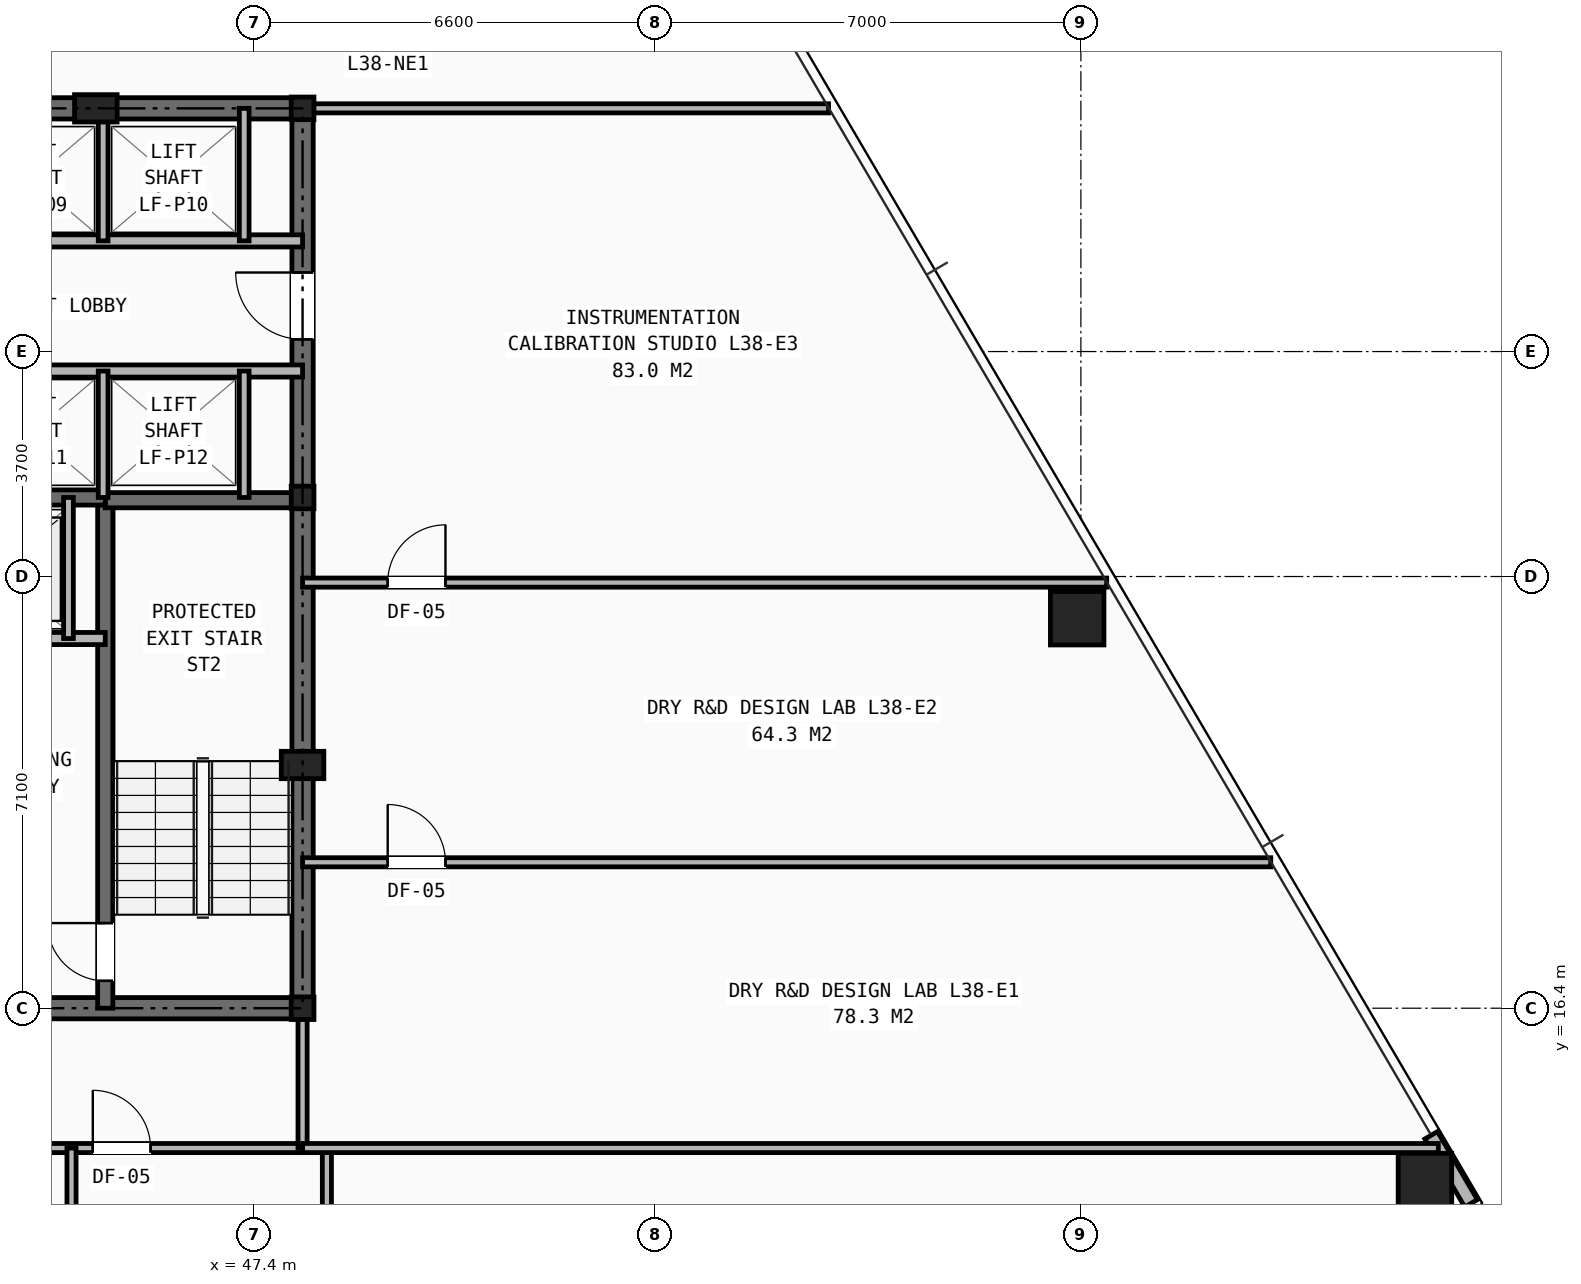
"""IFC4 building model, lengths in metres.
Left out: names, types, materials, properties, quantities, classifications, styles, units other than length and angle.
Written with IfcOpenShell. Run it as: python <this file> out.ifc"""

import sys

from ifc_helpers import new_model, si_unit, direction, frame, frame_2d, origin, origin_2d, place, context, subcontext, project, spatial, rectangle, hollow_rectangle, i_section, extrude, element, fill, save


model = new_model("IFC4")
c1 = context("Model", 3, precision=1e-05, world=origin(), true_north=direction((0.0, 1.0)))
c2 = subcontext(c1, "Body", "Model", "MODEL_VIEW")
j1 = project(units=[si_unit("LENGTHUNIT", "METRE"), si_unit("PLANEANGLEUNIT", "RADIAN")], contexts=[c1])
p1 = place(None, origin())
s1 = spatial("IfcSite", under=j1, at=p1, CompositionType="ELEMENT")
p2 = place(p1, origin())
s2 = spatial("IfcBuilding", under=s1, at=p2, CompositionType="ELEMENT")
p3 = place(p2, frame((0.0, 0.0, 133.25)))
s3 = spatial("IfcBuildingStorey", under=s2, at=p3, CompositionType="ELEMENT", Elevation=133.25)
for number, where, z_axis, x_axis in (
    (1, (48.2, 16.4, 0.0), (0.0, 0.0, 1.0), (1.0, 0.0, 0.0)),
    (2, (48.2, 24.8, 0.0), (0.0, 0.0, 1.0), (1.0, 0.0, 0.0)),
    (3, (48.2, 31.2, 0.0), (0.0, 0.0, 1.0), (1.0, 0.0, 0.0)),
):
    element("IfcColumn", number, at=place(p3, frame(where, z_axis=z_axis, x_axis=x_axis)), inside=s3, PredefinedType="COLUMN", context=c2, shape_type="SweptSolid", body=[
        extrude(i_section(OverallWidth=0.374, OverallDepth=0.372, WebThickness=0.016, FlangeThickness=0.026, at=origin_2d()), origin(), (0.0, 0.0, 1.0), 3.45),
    ])
for number, where, z_axis, x_axis in (
    (4, (48.2, 20.4, 0.0), (0.0, 0.0, 1.0), (1.0, 0.0, 0.0)),
    (5, (44.8, 31.2, 0.0), (0.0, 0.0, 1.0), (1.0, 0.0, 0.0)),
):
    element("IfcColumn", number, at=place(p3, frame(where, z_axis=z_axis, x_axis=x_axis)), inside=s3, PredefinedType="PILASTER", context=c2, shape_type="SweptSolid", body=[
        extrude(rectangle(XDim=0.7, YDim=0.45, at=origin_2d()), origin(), (0.0, 0.0, 1.0), 3.45),
    ])
for number, where, z_axis, x_axis in (
    (6, (66.658, 13.573, 0.0), (0.0, 0.0, 1.0), (1.0, 0.0, 0.0)),
    (7, (60.939, 22.814, 0.0), (0.0, 0.0, 1.0), (1.0, 0.0, 0.0)),
):
    element("IfcColumn", number, at=place(p3, frame(where, z_axis=z_axis, x_axis=x_axis)), inside=s3, PredefinedType="COLUMN", context=c2, shape_type="SweptSolid", body=[
        extrude(hollow_rectangle(XDim=0.88, YDim=0.88, WallThickness=0.06, at=origin_2d()), origin(), (0.0, 0.0, 1.0), 3.45),
    ])
p4 = place(p3, frame((67.417, 13.191, 0.0), z_axis=(0.0, 0.0, 1.0), x_axis=(-0.50575330013, 0.86267815517, 0.0)))
e8 = element("IfcWall", 8, at=p4, inside=s3, PredefinedType="SHEAR", context=c2, shape_type="SweptSolid", body=[
    extrude(rectangle(XDim=1.298, YDim=0.24, at=frame_2d((0.649, 0.0))), origin(), (0.0, 0.0, 1.0), 2.583),
])
p5 = place(p3, frame((31.8, 16.4, 0.0), z_axis=(0.0, 0.0, 1.0), x_axis=(1.0, 0.0, 0.0)))
e9 = element("IfcWall", 9, at=p5, inside=s3, PredefinedType="SHEAR", context=c2, shape_type="SweptSolid", body=[
    extrude(rectangle(XDim=16.4, YDim=0.35, at=frame_2d((8.2, 0.0))), origin(), (0.0, 0.0, 1.0), 3.21),
])
p6 = place(p5, frame((7.75, 0.0, 0.0)))
e10 = element("IfcOpeningElement", 10, at=p6, cuts=e9, PredefinedType="OPENING", context=c2, shape_type="SweptSolid", body=[
    extrude(rectangle(XDim=0.9, YDim=2.1, at=frame_2d((0.45, 1.05))), frame((0.0, 0.185, 0.0), z_axis=(0.0, -1.0, 0.0), x_axis=(1.0, 0.0, 0.0)), (0.0, 0.0, 1.0), 0.37),
])
p7 = place(p5, frame((4.2, 0.0, 0.0)))
e11 = element("IfcOpeningElement", 11, at=p7, cuts=e9, PredefinedType="OPENING", context=c2, shape_type="SweptSolid", body=[
    extrude(rectangle(XDim=0.95, YDim=2.1, at=frame_2d((0.475, 1.05))), frame((0.0, 0.185, 0.0), z_axis=(0.0, -1.0, 0.0), x_axis=(1.0, 0.0, 0.0)), (0.0, 0.0, 1.0), 0.37),
])
p8 = place(p5, frame((10.6, 0.0, 0.0)))
e12 = element("IfcOpeningElement", 12, at=p8, cuts=e9, PredefinedType="OPENING", context=c2, shape_type="SweptSolid", body=[
    extrude(rectangle(XDim=0.95, YDim=2.1, at=frame_2d((0.475, 1.05))), frame((0.0, 0.185, 0.0), z_axis=(0.0, -1.0, 0.0), x_axis=(1.0, 0.0, 0.0)), (0.0, 0.0, 1.0), 0.37),
])
p9 = place(p3, frame((31.8, 31.2, 0.0), z_axis=(0.0, 0.0, 1.0), x_axis=(1.0, 0.0, 0.0)))
e13 = element("IfcWall", 13, at=p9, inside=s3, PredefinedType="SHEAR", context=c2, shape_type="SweptSolid", body=[
    extrude(rectangle(XDim=16.4, YDim=0.35, at=frame_2d((8.2, 0.0))), origin(), (0.0, 0.0, 1.0), 3.21),
])
p10 = place(p3, frame((48.2, 16.4, 0.0), z_axis=(0.0, 0.0, 1.0), x_axis=(0.0, 1.0, 0.0)))
e14 = element("IfcWall", 14, at=p10, inside=s3, PredefinedType="SHEAR", context=c2, shape_type="SweptSolid", body=[
    extrude(rectangle(XDim=14.8, YDim=0.35, at=frame_2d((7.4, 0.0))), origin(), (0.0, 0.0, 1.0), 3.21),
])
p11 = place(p10, frame((11.0, 0.0, 0.0)))
e15 = element("IfcOpeningElement", 15, at=p11, cuts=e14, PredefinedType="OPENING", context=c2, shape_type="SweptSolid", body=[
    extrude(rectangle(XDim=1.1, YDim=2.15, at=frame_2d((0.55, 1.075))), frame((0.0, 0.185, 0.0), z_axis=(0.0, -1.0, 0.0), x_axis=(1.0, 0.0, 0.0)), (0.0, 0.0, 1.0), 0.37),
])
p12 = place(p3, frame((44.955, 16.4, 0.0), z_axis=(0.0, 0.0, 1.0), x_axis=(0.0, 1.0, 0.0)))
e16 = element("IfcWall", 16, at=p12, inside=s3, PredefinedType="SHEAR", context=c2, shape_type="SweptSolid", body=[
    extrude(rectangle(XDim=8.4, YDim=0.25, at=frame_2d((4.2, 0.0))), origin(), (0.0, 0.0, 1.0), 3.21),
])
p13 = place(p12, frame((0.45, 0.0, 0.0)))
e17 = element("IfcOpeningElement", 17, at=p13, cuts=e16, PredefinedType="OPENING", context=c2, shape_type="SweptSolid", body=[
    extrude(rectangle(XDim=0.95, YDim=2.1, at=frame_2d((0.475, 1.05))), frame((0.0, 0.135, 0.0), z_axis=(0.0, -1.0, 0.0), x_axis=(1.0, 0.0, 0.0)), (0.0, 0.0, 1.0), 0.27),
])
p14 = place(p3, frame((44.955, 24.755, 0.0), z_axis=(0.0, 0.0, 1.0), x_axis=(1.0, 0.0, 0.0)))
e18 = element("IfcWall", 18, at=p14, inside=s3, PredefinedType="SHEAR", context=c2, shape_type="SweptSolid", body=[
    extrude(rectangle(XDim=3.245, YDim=0.25, at=frame_2d((1.623, 0.0))), origin(), (0.0, 0.0, 1.0), 3.21),
])
p15 = place(p3, frame((35.045, 24.8, 0.0), z_axis=(0.0, 0.0, 1.0), x_axis=(1.0, 0.0, 0.0)))
e19 = element("IfcWall", 19, at=p15, inside=s3, PredefinedType="SHEAR", context=c2, shape_type="SweptSolid", body=[
    extrude(rectangle(XDim=9.91, YDim=0.25, at=frame_2d((4.955, 0.0))), origin(), (0.0, 0.0, 1.0), 3.21),
])
p16 = place(p3, frame((35.045, 22.48, 0.0), z_axis=(0.0, 0.0, 1.0), x_axis=(1.0, 0.0, 0.0)))
e20 = element("IfcWall", 20, at=p16, inside=s3, PredefinedType="SOLIDWALL", context=c2, shape_type="SweptSolid", body=[
    extrude(rectangle(XDim=9.91, YDim=0.2, at=frame_2d((4.955, 0.0))), origin(), (0.0, 0.0, 1.0), 3.21),
])
p17 = place(p16, frame((1.255, 0.0, 0.0)))
e21 = element("IfcOpeningElement", 21, at=p17, cuts=e20, PredefinedType="OPENING", context=c2, shape_type="SweptSolid", body=[
    extrude(rectangle(XDim=1.1, YDim=2.15, at=frame_2d((0.55, 1.075))), frame((0.0, 0.11, 0.0), z_axis=(0.0, -1.0, 0.0), x_axis=(1.0, 0.0, 0.0)), (0.0, 0.0, 1.0), 0.22),
])
p18 = place(p16, frame((7.555, 0.0, 0.0)))
e22 = element("IfcOpeningElement", 22, at=p18, cuts=e20, PredefinedType="OPENING", context=c2, shape_type="SweptSolid", body=[
    extrude(rectangle(XDim=1.1, YDim=2.15, at=frame_2d((0.55, 1.075))), frame((0.0, 0.11, 0.0), z_axis=(0.0, -1.0, 0.0), x_axis=(1.0, 0.0, 0.0)), (0.0, 0.0, 1.0), 0.22),
])
p19 = place(p16, frame((4.405, 0.0, 0.0)))
e23 = element("IfcOpeningElement", 23, at=p19, cuts=e20, PredefinedType="OPENING", context=c2, shape_type="SweptSolid", body=[
    extrude(rectangle(XDim=1.1, YDim=2.15, at=frame_2d((0.55, 1.075))), frame((0.0, 0.11, 0.0), z_axis=(0.0, -1.0, 0.0), x_axis=(1.0, 0.0, 0.0)), (0.0, 0.0, 1.0), 0.22),
])
p20 = place(p3, frame((44.35, 22.48, 0.0), z_axis=(0.0, 0.0, 1.0), x_axis=(0.0, 1.0, 0.0)))
e24 = element("IfcWall", 24, at=p20, inside=s3, PredefinedType="SOLIDWALL", context=c2, shape_type="SweptSolid", body=[
    extrude(rectangle(XDim=2.32, YDim=0.16, at=frame_2d((1.16, 0.0))), origin(), (0.0, 0.0, 1.0), 3.21),
])
p21 = place(p3, frame((31.8, 29.02, 0.0), z_axis=(0.0, 0.0, 1.0), x_axis=(1.0, 0.0, 0.0)))
e25 = element("IfcWall", 25, at=p21, inside=s3, PredefinedType="SOLIDWALL", context=c2, shape_type="SweptSolid", body=[
    extrude(rectangle(XDim=16.4, YDim=0.2, at=frame_2d((8.2, 0.0))), origin(), (0.0, 0.0, 1.0), 2.661),
])
p22 = place(p21, frame((0.55, 0.0, 0.0)))
e26 = element("IfcOpeningElement", 26, at=p22, cuts=e25, PredefinedType="OPENING", context=c2, shape_type="SweptSolid", body=[
    extrude(rectangle(XDim=0.85, YDim=2.05, at=frame_2d((0.425, 1.025))), frame((0.0, 0.11, 0.0), z_axis=(0.0, -1.0, 0.0), x_axis=(1.0, 0.0, 0.0)), (0.0, 0.0, 1.0), 0.22),
])
p23 = place(p21, frame((5.94, 0.0, 0.0)))
e27 = element("IfcOpeningElement", 27, at=p23, cuts=e25, PredefinedType="OPENING", context=c2, shape_type="SweptSolid", body=[
    extrude(rectangle(XDim=0.9, YDim=2.1, at=frame_2d((0.45, 1.05))), frame((0.0, 0.11, 0.0), z_axis=(0.0, -1.0, 0.0), x_axis=(1.0, 0.0, 0.0)), (0.0, 0.0, 1.0), 0.22),
])
p24 = place(p3, frame((33.82, 26.88, 0.0), z_axis=(0.0, 0.0, 1.0), x_axis=(1.0, 0.0, 0.0)))
e28 = element("IfcWall", 28, at=p24, inside=s3, PredefinedType="SOLIDWALL", context=c2, shape_type="SweptSolid", body=[
    extrude(rectangle(XDim=14.38, YDim=0.2, at=frame_2d((7.19, 0.0))), origin(), (0.0, 0.0, 1.0), 2.661),
])
p25 = place(p24, frame((0.53, 0.0, 0.0)))
e29 = element("IfcOpeningElement", 29, at=p25, cuts=e28, PredefinedType="OPENING", context=c2, shape_type="SweptSolid", body=[
    extrude(rectangle(XDim=1.1, YDim=2.15, at=frame_2d((0.55, 1.075))), frame((0.0, 0.11, 0.0), z_axis=(0.0, -1.0, 0.0), x_axis=(1.0, 0.0, 0.0)), (0.0, 0.0, 1.0), 0.22),
])
p26 = place(p24, frame((2.69, 0.0, 0.0)))
e30 = element("IfcOpeningElement", 30, at=p26, cuts=e28, PredefinedType="OPENING", context=c2, shape_type="SweptSolid", body=[
    extrude(rectangle(XDim=1.1, YDim=2.15, at=frame_2d((0.55, 1.075))), frame((0.0, 0.11, 0.0), z_axis=(0.0, -1.0, 0.0), x_axis=(1.0, 0.0, 0.0)), (0.0, 0.0, 1.0), 0.22),
])
p27 = place(p24, frame((4.85, 0.0, 0.0)))
e31 = element("IfcOpeningElement", 31, at=p27, cuts=e28, PredefinedType="OPENING", context=c2, shape_type="SweptSolid", body=[
    extrude(rectangle(XDim=1.1, YDim=2.15, at=frame_2d((0.55, 1.075))), frame((0.0, 0.11, 0.0), z_axis=(0.0, -1.0, 0.0), x_axis=(1.0, 0.0, 0.0)), (0.0, 0.0, 1.0), 0.22),
])
p28 = place(p24, frame((7.01, 0.0, 0.0)))
e32 = element("IfcOpeningElement", 32, at=p28, cuts=e28, PredefinedType="OPENING", context=c2, shape_type="SweptSolid", body=[
    extrude(rectangle(XDim=1.1, YDim=2.15, at=frame_2d((0.55, 1.075))), frame((0.0, 0.11, 0.0), z_axis=(0.0, -1.0, 0.0), x_axis=(1.0, 0.0, 0.0)), (0.0, 0.0, 1.0), 0.22),
])
for number, where, z_axis, x_axis in (
    (33, (44.92, 29.02, 0.0), (0.0, 0.0, 1.0), (0.0, 1.0, 0.0)),
    (34, (47.24, 29.02, 0.0), (0.0, 0.0, 1.0), (0.0, 1.0, 0.0)),
):
    element("IfcWall", number, at=place(p3, frame(where, z_axis=z_axis, x_axis=x_axis)), inside=s3, PredefinedType="SOLIDWALL", context=c2, shape_type="SweptSolid", body=[
        extrude(rectangle(XDim=2.18, YDim=0.16, at=frame_2d((1.09, 0.0))), origin(), (0.0, 0.0, 1.0), 2.661),
    ])
for number, where, z_axis, x_axis in (
    (35, (44.92, 24.8, 0.0), (0.0, 0.0, 1.0), (0.0, 1.0, 0.0)),
    (36, (47.24, 24.8, 0.0), (0.0, 0.0, 1.0), (0.0, 1.0, 0.0)),
):
    element("IfcWall", number, at=place(p3, frame(where, z_axis=z_axis, x_axis=x_axis)), inside=s3, PredefinedType="SOLIDWALL", context=c2, shape_type="SweptSolid", body=[
        extrude(rectangle(XDim=2.08, YDim=0.16, at=frame_2d((1.04, 0.0))), origin(), (0.0, 0.0, 1.0), 3.21),
    ])
p29 = place(p3, frame((29.6, 14.1, 0.0), z_axis=(0.0, 0.0, 1.0), x_axis=(1.0, 0.0, 0.0)))
e37 = element("IfcWall", 37, at=p29, inside=s3, PredefinedType="PARTITIONING", context=c2, shape_type="SweptSolid", body=[
    extrude(rectangle(XDim=18.6, YDim=0.15, at=frame_2d((9.3, 0.0))), origin(), (0.0, 0.0, 1.0), 2.252),
])
p30 = place(p29, frame((0.55, 0.0, 0.0)))
e38 = element("IfcOpeningElement", 38, at=p30, cuts=e37, PredefinedType="OPENING", context=c2, shape_type="SweptSolid", body=[
    extrude(rectangle(XDim=0.95, YDim=2.1, at=frame_2d((0.475, 1.05))), frame((0.0, 0.085, 0.0), z_axis=(0.0, -1.0, 0.0), x_axis=(1.0, 0.0, 0.0)), (0.0, 0.0, 1.0), 0.17),
])
p31 = place(p29, frame((2.55, 0.0, 0.0)))
e39 = element("IfcOpeningElement", 39, at=p31, cuts=e37, PredefinedType="OPENING", context=c2, shape_type="SweptSolid", body=[
    extrude(rectangle(XDim=0.95, YDim=2.1, at=frame_2d((0.475, 1.05))), frame((0.0, 0.085, 0.0), z_axis=(0.0, -1.0, 0.0), x_axis=(1.0, 0.0, 0.0)), (0.0, 0.0, 1.0), 0.17),
])
p32 = place(p29, frame((6.75, 0.0, 0.0)))
e40 = element("IfcOpeningElement", 40, at=p32, cuts=e37, PredefinedType="OPENING", context=c2, shape_type="SweptSolid", body=[
    extrude(rectangle(XDim=0.95, YDim=2.1, at=frame_2d((0.475, 1.05))), frame((0.0, 0.085, 0.0), z_axis=(0.0, -1.0, 0.0), x_axis=(1.0, 0.0, 0.0)), (0.0, 0.0, 1.0), 0.17),
])
p33 = place(p29, frame((10.95, 0.0, 0.0)))
e41 = element("IfcOpeningElement", 41, at=p33, cuts=e37, PredefinedType="OPENING", context=c2, shape_type="SweptSolid", body=[
    extrude(rectangle(XDim=0.95, YDim=2.1, at=frame_2d((0.475, 1.05))), frame((0.0, 0.085, 0.0), z_axis=(0.0, -1.0, 0.0), x_axis=(1.0, 0.0, 0.0)), (0.0, 0.0, 1.0), 0.17),
])
p34 = place(p29, frame((15.15, 0.0, 0.0)))
e42 = element("IfcOpeningElement", 42, at=p34, cuts=e37, PredefinedType="OPENING", context=c2, shape_type="SweptSolid", body=[
    extrude(rectangle(XDim=0.95, YDim=2.1, at=frame_2d((0.475, 1.05))), frame((0.0, 0.085, 0.0), z_axis=(0.0, -1.0, 0.0), x_axis=(1.0, 0.0, 0.0)), (0.0, 0.0, 1.0), 0.17),
])
p35 = place(p3, frame((48.2, 14.1, 0.0), z_axis=(0.0, 0.0, 1.0), x_axis=(0.0, 1.0, 0.0)))
e43 = element("IfcWall", 43, at=p35, inside=s3, PredefinedType="PARTITIONING", context=c2, shape_type="SweptSolid", body=[
    extrude(rectangle(XDim=2.3, YDim=0.15, at=frame_2d((1.15, 0.0))), origin(), (0.0, 0.0, 1.0), 2.661),
])
p36 = place(p3, frame((44.4, 6.094, 0.0), z_axis=(0.0, 0.0, 1.0), x_axis=(0.0, 1.0, 0.0)))
e44 = element("IfcWall", 44, at=p36, inside=s3, PredefinedType="PARTITIONING", context=c2, shape_type="SweptSolid", body=[
    extrude(rectangle(XDim=8.007, YDim=0.15, at=frame_2d((4.003, 0.0))), origin(), (0.0, 0.0, 1.0), 2.589),
])
p37 = place(p3, frame((48.6, 6.065, 0.0), z_axis=(0.0, 0.0, 1.0), x_axis=(0.0, 1.0, 0.0)))
e45 = element("IfcWall", 45, at=p37, inside=s3, PredefinedType="PARTITIONING", context=c2, shape_type="SweptSolid", body=[
    extrude(rectangle(XDim=8.035, YDim=0.15, at=frame_2d((4.018, 0.0))), origin(), (0.0, 0.0, 1.0), 2.589),
])
p38 = place(p3, frame((48.2, 31.2, 0.0), z_axis=(0.0, 0.0, 1.0), x_axis=(1.0, 0.0, 0.0)))
e46 = element("IfcWall", 46, at=p38, inside=s3, PredefinedType="PARTITIONING", context=c2, shape_type="SweptSolid", body=[
    extrude(rectangle(XDim=8.65, YDim=0.15, at=frame_2d((4.325, 0.0))), origin(), (0.0, 0.0, 1.0), 2.252),
])
p39 = place(p3, frame((48.2, 14.1, 0.0), z_axis=(0.0, 0.0, 1.0), x_axis=(1.0, 0.0, 0.0)))
e47 = element("IfcWall", 47, at=p39, inside=s3, PredefinedType="PARTITIONING", context=c2, shape_type="SweptSolid", body=[
    extrude(rectangle(XDim=18.678, YDim=0.15, at=frame_2d((9.339, 0.0))), origin(), (0.0, 0.0, 1.0), 2.589),
])
p40 = place(p3, frame((48.2, 18.8, 0.0), z_axis=(0.0, 0.0, 1.0), x_axis=(1.0, 0.0, 0.0)))
e48 = element("IfcWall", 48, at=p40, inside=s3, PredefinedType="PARTITIONING", context=c2, shape_type="SweptSolid", body=[
    extrude(rectangle(XDim=15.922, YDim=0.15, at=frame_2d((7.961, 0.0))), origin(), (0.0, 0.0, 1.0), 2.589),
])
p41 = place(p40, frame((1.4, 0.0, 0.0)))
e49 = element("IfcOpeningElement", 49, at=p41, cuts=e48, PredefinedType="OPENING", context=c2, shape_type="SweptSolid", body=[
    extrude(rectangle(XDim=0.95, YDim=2.1, at=frame_2d((0.475, 1.05))), frame((0.0, 0.085, 0.0), z_axis=(0.0, -1.0, 0.0), x_axis=(1.0, 0.0, 0.0)), (0.0, 0.0, 1.0), 0.17),
])
p42 = place(p3, frame((48.2, 23.4, 0.0), z_axis=(0.0, 0.0, 1.0), x_axis=(1.0, 0.0, 0.0)))
e50 = element("IfcWall", 50, at=p42, inside=s3, PredefinedType="PARTITIONING", context=c2, shape_type="SweptSolid", body=[
    extrude(rectangle(XDim=13.225, YDim=0.15, at=frame_2d((6.612, 0.0))), origin(), (0.0, 0.0, 1.0), 2.589),
])
p43 = place(p42, frame((1.4, 0.0, 0.0)))
e51 = element("IfcOpeningElement", 51, at=p43, cuts=e50, PredefinedType="OPENING", context=c2, shape_type="SweptSolid", body=[
    extrude(rectangle(XDim=0.95, YDim=2.1, at=frame_2d((0.475, 1.05))), frame((0.0, 0.085, 0.0), z_axis=(0.0, -1.0, 0.0), x_axis=(1.0, 0.0, 0.0)), (0.0, 0.0, 1.0), 0.17),
])
p44 = place(p13, origin())
e52 = element("IfcDoor", 52, at=p44, inside=s3, OperationType="SINGLE_SWING_RIGHT", PredefinedType="DOOR", context=c2, shape_type="SweptSolid", body=[
    extrude(rectangle(XDim=0.95, YDim=2.1, at=frame_2d((0.475, 1.05))), frame((0.0, 0.025, 0.0), z_axis=(0.0, -1.0, 0.0), x_axis=(1.0, 0.0, 0.0)), (0.0, 0.0, 1.0), 0.05),
])
fill(e17, e52)
p45 = place(p11, origin())
e53 = element("IfcDoor", 53, at=p45, inside=s3, OperationType="SINGLE_SWING_RIGHT", PredefinedType="DOOR", context=c2, shape_type="SweptSolid", body=[
    extrude(rectangle(XDim=1.1, YDim=2.15, at=frame_2d((0.55, 1.075))), frame((0.0, 0.025, 0.0), z_axis=(0.0, -1.0, 0.0), x_axis=(1.0, 0.0, 0.0)), (0.0, 0.0, 1.0), 0.05),
])
fill(e15, e53)
p46 = place(p34, origin())
e54 = element("IfcDoor", 54, at=p46, inside=s3, OperationType="SINGLE_SWING_LEFT", PredefinedType="DOOR", context=c2, shape_type="SweptSolid", body=[
    extrude(rectangle(XDim=0.95, YDim=2.1, at=frame_2d((0.475, 1.05))), frame((0.0, 0.025, 0.0), z_axis=(0.0, -1.0, 0.0), x_axis=(1.0, 0.0, 0.0)), (0.0, 0.0, 1.0), 0.05),
])
fill(e42, e54)
p47 = place(p41, origin())
e55 = element("IfcDoor", 55, at=p47, inside=s3, OperationType="SINGLE_SWING_LEFT", PredefinedType="DOOR", context=c2, shape_type="SweptSolid", body=[
    extrude(rectangle(XDim=0.95, YDim=2.1, at=frame_2d((0.475, 1.05))), frame((0.0, 0.025, 0.0), z_axis=(0.0, -1.0, 0.0), x_axis=(1.0, 0.0, 0.0)), (0.0, 0.0, 1.0), 0.05),
])
fill(e49, e55)
p48 = place(p43, origin())
e56 = element("IfcDoor", 56, at=p48, inside=s3, OperationType="SINGLE_SWING_RIGHT", PredefinedType="DOOR", context=c2, shape_type="SweptSolid", body=[
    extrude(rectangle(XDim=0.95, YDim=2.1, at=frame_2d((0.475, 1.05))), frame((0.0, 0.025, 0.0), z_axis=(0.0, -1.0, 0.0), x_axis=(1.0, 0.0, 0.0)), (0.0, 0.0, 1.0), 0.05),
])
fill(e51, e56)
save(model, sys.argv[1])
